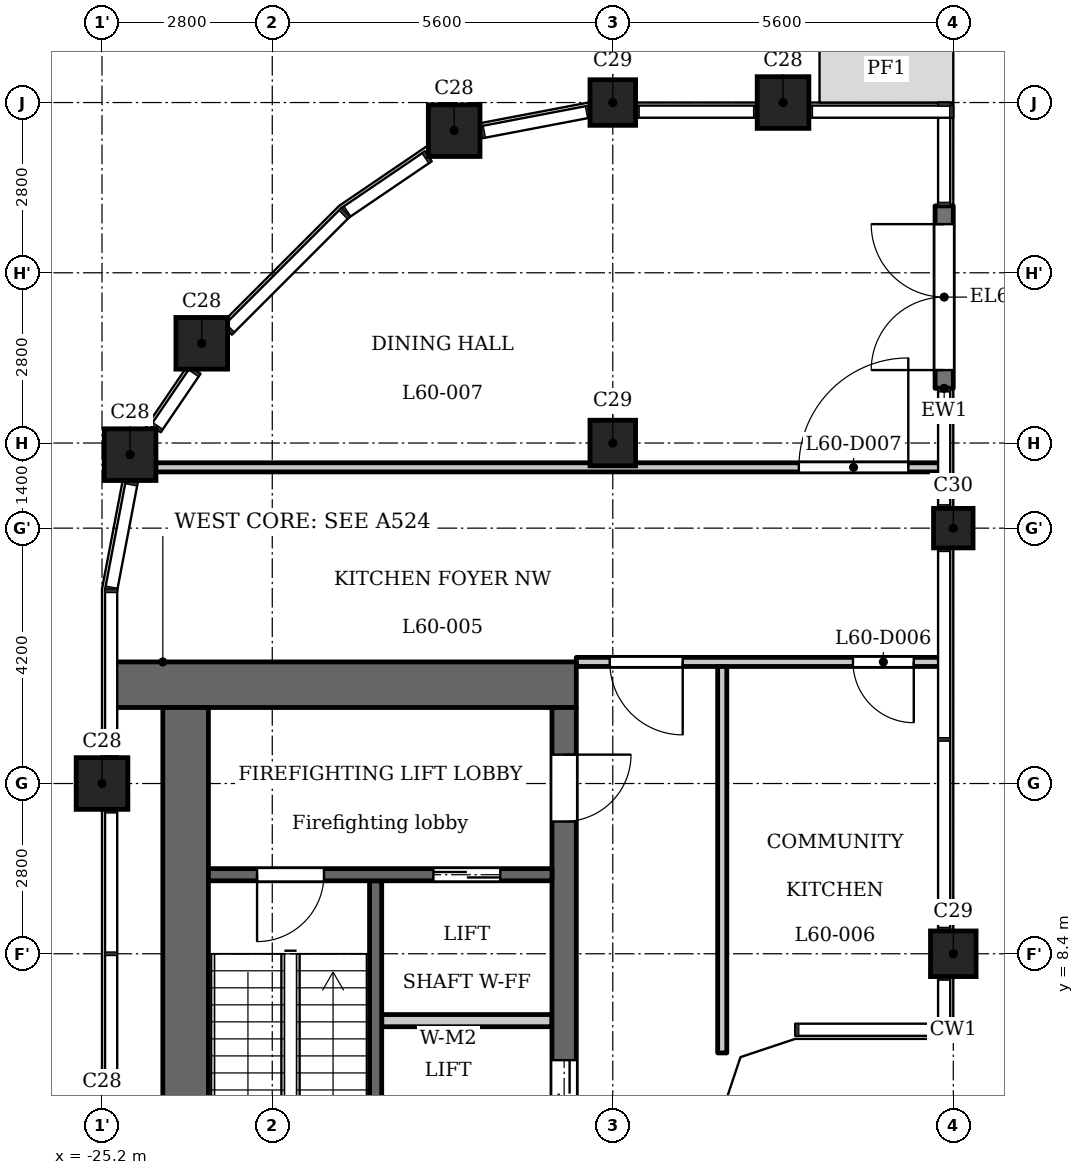
"""IFC4 building model, lengths in metres.
Left out: names, types, materials, properties, quantities, classifications, styles, units other than length and angle.
Written with IfcOpenShell. Run it as: python <this file> out.ifc"""

import sys

from ifc_helpers import new_model, si_unit, direction, frame, frame_2d, origin, origin_2d, place, context, subcontext, project, spatial, polyline, rectangle, outline, extrude, element, fill, save


model = new_model("IFC4")
c1 = context("Model", 3, precision=1e-05, world=origin(), true_north=direction((0.0, 1.0)))
c2 = subcontext(c1, "Body", "Model", "MODEL_VIEW")
j1 = project(units=[si_unit("LENGTHUNIT", "METRE"), si_unit("PLANEANGLEUNIT", "RADIAN")], contexts=[c1])
p1 = place(None, origin())
s1 = spatial("IfcSite", under=j1, at=p1, CompositionType="ELEMENT")
p2 = place(p1, origin())
s2 = spatial("IfcBuilding", under=s1, at=p2, CompositionType="ELEMENT")
p3 = place(p2, frame((0.0, 0.0, 230.9)))
s3 = spatial("IfcBuildingStorey", under=s2, at=p3, CompositionType="ELEMENT", Elevation=230.9)
for number, where, z_axis, x_axis in (
    (1, (-14.0, 22.4, 0.0), (0.0, 0.0, 1.0), (1.0, 0.0, 0.0)),
    (2, (-19.409, 21.938, 0.0), (0.0, 0.0, 1.0), (1.0, 0.0, 0.0)),
    (3, (-23.56, 18.44, 0.0), (0.0, 0.0, 1.0), (1.0, 0.0, 0.0)),
    (4, (-24.738, 16.609, 0.0), (0.0, 0.0, 1.0), (1.0, 0.0, 0.0)),
    (5, (-25.2, 11.2, 0.0), (0.0, 0.0, 1.0), (1.0, 0.0, 0.0)),
):
    element("IfcColumn", number, at=place(p3, frame(where, z_axis=z_axis, x_axis=x_axis)), inside=s3, PredefinedType="COLUMN", context=c2, shape_type="SweptSolid", body=[
        extrude(rectangle(XDim=0.85, YDim=0.85, at=origin_2d()), origin(), (0.0, 0.0, 1.0), 5.4),
    ])
for number, where, z_axis, x_axis in (
    (6, (-16.8, 16.8, 0.0), (0.0, 0.0, 1.0), (1.0, 0.0, 0.0)),
    (7, (-16.8, 22.4, 0.0), (0.0, 0.0, 1.0), (1.0, 0.0, 0.0)),
    (8, (-11.2, 8.4, 0.0), (0.0, 0.0, 1.0), (1.0, 0.0, 0.0)),
):
    element("IfcColumn", number, at=place(p3, frame(where, z_axis=z_axis, x_axis=x_axis)), inside=s3, PredefinedType="COLUMN", context=c2, shape_type="SweptSolid", body=[
        extrude(rectangle(XDim=0.75, YDim=0.75, at=origin_2d()), origin(), (0.0, 0.0, 1.0), 5.4),
    ])
p4 = place(p3, frame((-11.2, 15.4, 0.0), z_axis=(0.0, 0.0, 1.0), x_axis=(1.0, 0.0, 0.0)))
e9 = element("IfcColumn", 9, at=p4, inside=s3, PredefinedType="COLUMN", context=c2, shape_type="SweptSolid", body=[
    extrude(rectangle(XDim=0.65, YDim=0.65, at=origin_2d()), origin(), (0.0, 0.0, 1.0), 5.4),
])
p5 = place(p3, frame((-11.35, 17.7, 0.0), z_axis=(0.0, 0.0, 1.0), x_axis=(0.0, 1.0, 0.0)))
e10 = element("IfcWall", 10, at=p5, inside=s3, PredefinedType="SOLIDWALL", context=c2, shape_type="SweptSolid", body=[
    extrude(rectangle(XDim=3.0, YDim=0.3, at=frame_2d((1.5, 0.0))), origin(), (0.0, 0.0, 1.0), 4.95),
])
p6 = place(p5, frame((0.3, 0.0, 0.0)))
e11 = element("IfcOpeningElement", 11, at=p6, cuts=e10, PredefinedType="OPENING", context=c2, shape_type="SweptSolid", body=[
    extrude(rectangle(XDim=2.4, YDim=2.3, at=frame_2d((1.2, 1.15))), frame((0.0, 0.16, 0.0), z_axis=(0.0, -1.0, 0.0), x_axis=(1.0, 0.0, 0.0)), (0.0, 0.0, 1.0), 0.32),
])
p7 = place(p3, frame((-20.7, 2.6, 0.0), z_axis=(0.0, 0.0, 1.0), x_axis=(0.0, 1.0, 0.0)))
e12 = element("IfcWall", 12, at=p7, inside=s3, PredefinedType="SHEAR", context=c2, shape_type="SweptSolid", body=[
    extrude(rectangle(XDim=7.0, YDim=0.2, at=frame_2d((3.5, 0.0))), origin(), (0.0, 0.0, 1.0), 4.95),
])
p8 = place(p3, frame((-17.4, 12.825, 0.0), z_axis=(0.0, 0.0, 1.0), x_axis=(-1.0, 0.0, 0.0)))
e13 = element("IfcWall", 13, at=p8, inside=s3, PredefinedType="SHEAR", context=c2, shape_type="SweptSolid", body=[
    extrude(rectangle(XDim=7.6, YDim=0.75, at=frame_2d((3.8, 0.0))), origin(), (0.0, 0.0, 1.0), 4.95),
])
p9 = place(p3, frame((-17.6, -12.45, 0.0), z_axis=(0.0, 0.0, 1.0), x_axis=(0.0, 1.0, 0.0)))
e14 = element("IfcWall", 14, at=p9, inside=s3, PredefinedType="SHEAR", context=c2, shape_type="SweptSolid", body=[
    extrude(rectangle(XDim=24.9, YDim=0.4, at=frame_2d((12.45, 0.0))), origin(), (0.0, 0.0, 1.0), 4.95),
])
p10 = place(p9, frame((8.65, 0.0, 0.0)))
e15 = element("IfcOpeningElement", 15, at=p10, cuts=e14, PredefinedType="OPENING", context=c2, shape_type="SweptSolid", body=[
    extrude(rectangle(XDim=0.9, YDim=2.1, at=frame_2d((0.45, 1.05))), frame((0.0, 0.21, 0.0), z_axis=(0.0, -1.0, 0.0), x_axis=(1.0, 0.0, 0.0)), (0.0, 0.0, 1.0), 0.42),
])
p11 = place(p9, frame((15.6, 0.0, 0.0)))
e16 = element("IfcOpeningElement", 16, at=p11, cuts=e14, PredefinedType="OPENING", context=c2, shape_type="SweptSolid", body=[
    extrude(rectangle(XDim=1.1, YDim=2.1, at=frame_2d((0.55, 1.05))), frame((0.0, 0.21, 0.0), z_axis=(0.0, -1.0, 0.0), x_axis=(1.0, 0.0, 0.0)), (0.0, 0.0, 1.0), 0.42),
])
p12 = place(p9, frame((18.0, 0.0, 0.0)))
e17 = element("IfcOpeningElement", 17, at=p12, cuts=e14, PredefinedType="OPENING", context=c2, shape_type="SweptSolid", body=[
    extrude(rectangle(XDim=1.1, YDim=2.1, at=frame_2d((0.55, 1.05))), frame((0.0, 0.21, 0.0), z_axis=(0.0, -1.0, 0.0), x_axis=(1.0, 0.0, 0.0)), (0.0, 0.0, 1.0), 0.42),
])
p13 = place(p9, frame((23.025, 0.0, 0.0)))
e18 = element("IfcOpeningElement", 18, at=p13, cuts=e14, PredefinedType="OPENING", context=c2, shape_type="SweptSolid", body=[
    extrude(rectangle(XDim=1.1, YDim=2.1, at=frame_2d((0.55, 1.05))), frame((0.0, 0.21, 0.0), z_axis=(0.0, -1.0, 0.0), x_axis=(1.0, 0.0, 0.0)), (0.0, 0.0, 1.0), 0.42),
])
p14 = place(p9, frame((0.775, 0.0, 0.0)))
e19 = element("IfcOpeningElement", 19, at=p14, cuts=e14, PredefinedType="OPENING", context=c2, shape_type="SweptSolid", body=[
    extrude(rectangle(XDim=1.1, YDim=2.1, at=frame_2d((0.55, 1.05))), frame((0.0, 0.21, 0.0), z_axis=(0.0, -1.0, 0.0), x_axis=(1.0, 0.0, 0.0)), (0.0, 0.0, 1.0), 0.42),
])
p15 = place(p9, frame((12.925, 0.0, 0.0)))
e20 = element("IfcOpeningElement", 20, at=p15, cuts=e14, PredefinedType="OPENING", context=c2, shape_type="SweptSolid", body=[
    extrude(rectangle(XDim=1.8, YDim=2.1, at=frame_2d((0.9, 1.05))), frame((0.0, 0.21, 0.0), z_axis=(0.0, -1.0, 0.0), x_axis=(1.0, 0.0, 0.0)), (0.0, 0.0, 1.0), 0.42),
])
p16 = place(p3, frame((-23.825, -12.45, 0.0), z_axis=(0.0, 0.0, 1.0), x_axis=(0.0, 1.0, 0.0)))
e21 = element("IfcWall", 21, at=p16, inside=s3, PredefinedType="SHEAR", context=c2, shape_type="SweptSolid", body=[
    extrude(rectangle(XDim=24.9, YDim=0.75, at=frame_2d((12.45, 0.0))), origin(), (0.0, 0.0, 1.0), 4.95),
])
p17 = place(p3, frame((-17.8, 7.3, 0.0), z_axis=(0.0, 0.0, 1.0), x_axis=(-1.0, 0.0, 0.0)))
e22 = element("IfcWall", 22, at=p17, inside=s3, PredefinedType="PARTITIONING", context=c2, shape_type="SweptSolid", body=[
    extrude(rectangle(XDim=2.8, YDim=0.2, at=frame_2d((1.4, 0.0))), origin(), (0.0, 0.0, 1.0), 4.95),
])
p18 = place(p3, frame((-17.8, 9.7, 0.0), z_axis=(0.0, 0.0, 1.0), x_axis=(-1.0, 0.0, 0.0)))
e23 = element("IfcWall", 23, at=p18, inside=s3, PredefinedType="SHEAR", context=c2, shape_type="SweptSolid", body=[
    extrude(rectangle(XDim=5.65, YDim=0.2, at=frame_2d((2.825, 0.0))), origin(), (0.0, 0.0, 1.0), 4.95),
])
p19 = place(p18, frame((0.85, 0.0, 0.0)))
e24 = element("IfcOpeningElement", 24, at=p19, cuts=e23, PredefinedType="OPENING", context=c2, shape_type="SweptSolid", body=[
    extrude(rectangle(XDim=1.1, YDim=2.1, at=frame_2d((0.55, 1.05))), frame((0.0, 0.11, 0.0), z_axis=(0.0, -1.0, 0.0), x_axis=(1.0, 0.0, 0.0)), (0.0, 0.0, 1.0), 0.22),
])
p20 = place(p18, frame((3.75, 0.0, 0.0)))
e25 = element("IfcOpeningElement", 25, at=p20, cuts=e23, PredefinedType="OPENING", context=c2, shape_type="SweptSolid", body=[
    extrude(rectangle(XDim=1.1, YDim=2.1, at=frame_2d((0.55, 1.05))), frame((0.0, 0.11, 0.0), z_axis=(0.0, -1.0, 0.0), x_axis=(1.0, 0.0, 0.0)), (0.0, 0.0, 1.0), 0.22),
])
p21 = place(p3, frame((-17.4, 13.2, 0.0), z_axis=(0.0, 0.0, 1.0), x_axis=(1.0, 0.0, 0.0)))
e26 = element("IfcWall", 26, at=p21, inside=s3, PredefinedType="PARTITIONING", context=c2, shape_type="SweptSolid", body=[
    extrude(rectangle(XDim=6.016, YDim=0.15, at=frame_2d((3.008, 0.0))), origin(), (0.0, 0.0, 1.0), 4.95),
])
p22 = place(p21, frame((0.55, 0.0, 0.0)))
e27 = element("IfcOpeningElement", 27, at=p22, cuts=e26, PredefinedType="OPENING", context=c2, shape_type="SweptSolid", body=[
    extrude(rectangle(XDim=1.2, YDim=2.1, at=frame_2d((0.6, 1.05))), frame((0.0, 0.085, 0.0), z_axis=(0.0, -1.0, 0.0), x_axis=(1.0, 0.0, 0.0)), (0.0, 0.0, 1.0), 0.17),
])
p23 = place(p21, frame((4.55, 0.0, 0.0)))
e28 = element("IfcOpeningElement", 28, at=p23, cuts=e26, PredefinedType="OPENING", context=c2, shape_type="SweptSolid", body=[
    extrude(rectangle(XDim=1.0, YDim=2.1, at=frame_2d((0.5, 1.05))), frame((0.0, 0.085, 0.0), z_axis=(0.0, -1.0, 0.0), x_axis=(1.0, 0.0, 0.0)), (0.0, 0.0, 1.0), 0.17),
])
p24 = place(p3, frame((-24.72, 16.4, 0.0), z_axis=(0.0, 0.0, 1.0), x_axis=(1.0, 0.0, 0.0)))
e29 = element("IfcWall", 29, at=p24, inside=s3, PredefinedType="PARTITIONING", context=c2, shape_type="SweptSolid", body=[
    extrude(rectangle(XDim=13.336, YDim=0.15, at=frame_2d((6.668, 0.0))), origin(), (0.0, 0.0, 1.0), 4.95),
])
p25 = place(p24, frame((10.98, 0.0, 0.0)))
e30 = element("IfcOpeningElement", 30, at=p25, cuts=e29, PredefinedType="OPENING", context=c2, shape_type="SweptSolid", body=[
    extrude(rectangle(XDim=1.8, YDim=2.1, at=frame_2d((0.9, 1.05))), frame((0.0, 0.085, 0.0), z_axis=(0.0, -1.0, 0.0), x_axis=(1.0, 0.0, 0.0)), (0.0, 0.0, 1.0), 0.17),
])
p26 = place(p3, frame((-15.0, 6.769, 0.0), z_axis=(0.0, 0.0, 1.0), x_axis=(0.0, 1.0, 0.0)))
e31 = element("IfcWall", 31, at=p26, inside=s3, PredefinedType="PARTITIONING", context=c2, shape_type="SweptSolid", body=[
    extrude(rectangle(XDim=6.356, YDim=0.15, at=frame_2d((3.178, 0.0))), origin(), (0.0, 0.0, 1.0), 4.95),
])
p27 = place(p3, origin())
e32 = element("IfcWall", 32, at=p27, inside=s3, PredefinedType="SOLIDWALL", context=c2, shape_type="SweptSolid", body=[
    extrude(outline(polyline([(-15.0, 5.8), (-14.7, 6.7), (-13.8, 7.0), (-13.8, 7.3), (-13.849, 7.3), (-14.937, 6.937), (-15.3, 5.849), (-15.3, 5.8), (-15.0, 5.8)])), origin(), (0.0, 0.0, 1.0), 4.95),
])
p28 = place(p6, origin())
e33 = element("IfcDoor", 33, at=p28, inside=s3, OperationType="SINGLE_SWING_LEFT", PredefinedType="DOOR", context=c2, shape_type="SweptSolid", body=[
    extrude(rectangle(XDim=2.4, YDim=2.3, at=frame_2d((1.2, 1.15))), frame((0.0, 0.025, 0.0), z_axis=(0.0, -1.0, 0.0), x_axis=(1.0, 0.0, 0.0)), (0.0, 0.0, 1.0), 0.05),
])
fill(e11, e33)
p29 = place(p12, origin())
e34 = element("IfcDoor", 34, at=p29, inside=s3, OperationType="DOUBLE_DOOR_SLIDING", PredefinedType="DOOR", context=c2, shape_type="SweptSolid", body=[
    extrude(rectangle(XDim=1.1, YDim=2.1, at=frame_2d((0.55, 1.05))), frame((0.0, 0.025, 0.0), z_axis=(0.0, -1.0, 0.0), x_axis=(1.0, 0.0, 0.0)), (0.0, 0.0, 1.0), 0.05),
])
fill(e17, e34)
p30 = place(p19, origin())
e35 = element("IfcDoor", 35, at=p30, inside=s3, OperationType="DOUBLE_DOOR_SLIDING", PredefinedType="DOOR", context=c2, shape_type="SweptSolid", body=[
    extrude(rectangle(XDim=1.1, YDim=2.1, at=frame_2d((0.55, 1.05))), frame((0.0, 0.025, 0.0), z_axis=(0.0, -1.0, 0.0), x_axis=(1.0, 0.0, 0.0)), (0.0, 0.0, 1.0), 0.05),
])
fill(e24, e35)
p31 = place(p13, origin())
e36 = element("IfcDoor", 36, at=p31, inside=s3, OperationType="SINGLE_SWING_RIGHT", PredefinedType="DOOR", context=c2, shape_type="SweptSolid", body=[
    extrude(rectangle(XDim=1.1, YDim=2.1, at=frame_2d((0.55, 1.05))), frame((0.0, 0.025, 0.0), z_axis=(0.0, -1.0, 0.0), x_axis=(1.0, 0.0, 0.0)), (0.0, 0.0, 1.0), 0.05),
])
fill(e18, e36)
p32 = place(p20, origin())
e37 = element("IfcDoor", 37, at=p32, inside=s3, OperationType="SINGLE_SWING_LEFT", PredefinedType="DOOR", context=c2, shape_type="SweptSolid", body=[
    extrude(rectangle(XDim=1.1, YDim=2.1, at=frame_2d((0.55, 1.05))), frame((0.0, 0.025, 0.0), z_axis=(0.0, -1.0, 0.0), x_axis=(1.0, 0.0, 0.0)), (0.0, 0.0, 1.0), 0.05),
])
fill(e25, e37)
p33 = place(p22, origin())
e38 = element("IfcDoor", 38, at=p33, inside=s3, OperationType="SINGLE_SWING_RIGHT", PredefinedType="DOOR", context=c2, shape_type="SweptSolid", body=[
    extrude(rectangle(XDim=1.2, YDim=2.1, at=frame_2d((0.6, 1.05))), frame((0.0, 0.025, 0.0), z_axis=(0.0, -1.0, 0.0), x_axis=(1.0, 0.0, 0.0)), (0.0, 0.0, 1.0), 0.05),
])
fill(e27, e38)
p34 = place(p23, origin())
e39 = element("IfcDoor", 39, at=p34, inside=s3, OperationType="SINGLE_SWING_RIGHT", PredefinedType="DOOR", context=c2, shape_type="SweptSolid", body=[
    extrude(rectangle(XDim=1.0, YDim=2.1, at=frame_2d((0.5, 1.05))), frame((0.0, 0.025, 0.0), z_axis=(0.0, -1.0, 0.0), x_axis=(1.0, 0.0, 0.0)), (0.0, 0.0, 1.0), 0.05),
])
fill(e28, e39)
p35 = place(p25, origin())
e40 = element("IfcDoor", 40, at=p35, inside=s3, OperationType="SINGLE_SWING_LEFT", PredefinedType="DOOR", context=c2, shape_type="SweptSolid", body=[
    extrude(rectangle(XDim=1.8, YDim=2.1, at=frame_2d((0.9, 1.05))), frame((0.0, 0.025, 0.0), z_axis=(0.0, -1.0, 0.0), x_axis=(1.0, 0.0, 0.0)), (0.0, 0.0, 1.0), 0.05),
])
fill(e30, e40)
save(model, sys.argv[1])
